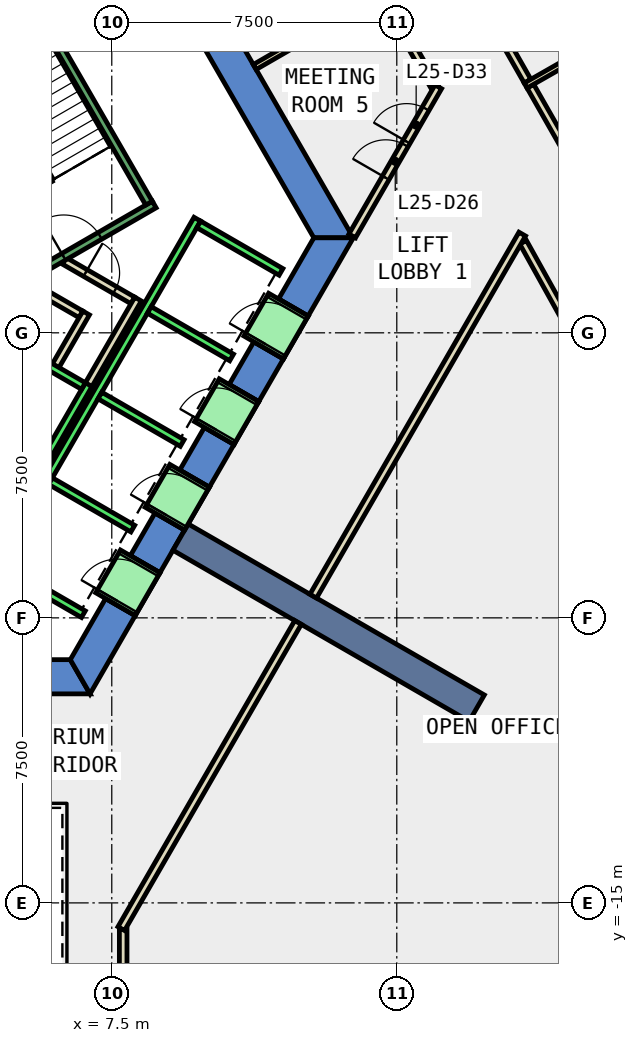
"""IFC4 building model, lengths in metres.
Left out: names, types, materials, properties, quantities, classifications, styles, units other than length and angle.
Written with IfcOpenShell. Run it as: python <this file> out.ifc"""

import sys

from ifc_helpers import new_model, si_unit, direction, frame, frame_2d, origin, place, context, subcontext, project, spatial, polyline, rectangle, outline, extrude, element, fill, save


model = new_model("IFC4")
c1 = context("Model", 3, precision=1e-05, world=origin(), true_north=direction((0.0, 1.0)))
c2 = subcontext(c1, "Body", "Model", "MODEL_VIEW")
j1 = project(units=[si_unit("LENGTHUNIT", "METRE"), si_unit("PLANEANGLEUNIT", "RADIAN")], contexts=[c1])
p1 = place(None, origin())
s1 = spatial("IfcSite", under=j1, at=p1, CompositionType="ELEMENT")
p2 = place(p1, origin())
s2 = spatial("IfcBuilding", under=s1, at=p2, CompositionType="ELEMENT")
p3 = place(p2, frame((0.0, 0.0, 116.0)))
s3 = spatial("IfcBuildingStorey", under=s2, at=p3, CompositionType="ELEMENT", Elevation=116.0)
p4 = place(p3, frame((0.0, 0.0, -0.4)))
e1 = element("IfcWall", 1, at=p4, inside=s3, PredefinedType="SHEAR", context=c2, shape_type="SweptSolid", body=[
    extrude(outline(polyline([(8.517, 11.748), (7.738, 11.298), (12.817, 2.5), (13.856, 2.5), (8.517, 11.748)])), origin(), (0.0, 0.0, 1.0), 4.2),
])
p5 = place(p3, frame((0.0, 0.0, -0.4)))
e2 = element("IfcWall", 2, at=p5, inside=s3, PredefinedType="SHEAR", context=c2, shape_type="SweptSolid", body=[
    extrude(outline(polyline([(5.75, -8.6), (5.75, -9.5), (6.928, -9.5), (6.409, -8.6), (5.75, -8.6)])), origin(), (0.0, 0.0, 1.0), 4.2),
])
p6 = place(p3, frame((0.0, 0.0, -0.4)))
e3 = element("IfcWall", 3, at=p6, inside=s3, PredefinedType="SHEAR", context=c2, shape_type="SweptSolid", body=[
    extrude(outline(polyline([(8.117, -7.44), (7.338, -6.99), (6.409, -8.6), (6.928, -9.5), (8.117, -7.44)])), origin(), (0.0, 0.0, 1.0), 4.2),
])
p7 = place(p3, frame((0.0, 0.0, -0.4)))
e4 = element("IfcWall", 4, at=p7, inside=s3, PredefinedType="SHEAR", context=c2, shape_type="SweptSolid", body=[
    extrude(outline(polyline([(9.417, -5.189), (8.638, -4.739), (7.988, -5.864), (8.767, -6.314), (9.417, -5.189)])), origin(), (0.0, 0.0, 1.0), 4.2),
])
p8 = place(p3, frame((0.0, 0.0, -0.4)))
e5 = element("IfcWall", 5, at=p8, inside=s3, PredefinedType="SHEAR", context=c2, shape_type="SweptSolid", body=[
    extrude(outline(polyline([(10.717, -2.937), (9.938, -2.487), (9.288, -3.613), (10.067, -4.063), (10.717, -2.937)])), origin(), (0.0, 0.0, 1.0), 4.2),
])
p9 = place(p3, frame((0.0, 0.0, -0.4)))
e6 = element("IfcWall", 6, at=p9, inside=s3, PredefinedType="SHEAR", context=c2, shape_type="SweptSolid", body=[
    extrude(outline(polyline([(12.017, -0.686), (11.238, -0.236), (10.588, -1.361), (11.367, -1.811), (12.017, -0.686)])), origin(), (0.0, 0.0, 1.0), 4.2),
])
p10 = place(p3, frame((0.0, 0.0, -0.4)))
e7 = element("IfcWall", 7, at=p10, inside=s3, PredefinedType="SHEAR", context=c2, shape_type="SweptSolid", body=[
    extrude(outline(polyline([(11.888, 0.89), (12.667, 0.44), (13.856, 2.5), (12.817, 2.5), (11.888, 0.89)])), origin(), (0.0, 0.0, 1.0), 4.2),
])
p11 = place(p3, frame((0.0, 0.0, 3.6)))
e8 = element("IfcWall", 8, at=p11, inside=s3, PredefinedType="SHEAR", context=c2, shape_type="SweptSolid", body=[
    extrude(outline(polyline([(8.767, -6.314), (7.988, -5.864), (7.338, -6.99), (8.117, -7.44), (8.767, -6.314)])), origin(), (0.0, 0.0, 1.0), 0.2),
])
p12 = place(p3, frame((0.0, 0.0, 3.6)))
e9 = element("IfcWall", 9, at=p12, inside=s3, PredefinedType="SHEAR", context=c2, shape_type="SweptSolid", body=[
    extrude(outline(polyline([(10.067, -4.063), (9.288, -3.613), (8.638, -4.739), (9.417, -5.189), (10.067, -4.063)])), origin(), (0.0, 0.0, 1.0), 0.2),
])
p13 = place(p3, frame((0.0, 0.0, 3.6)))
e10 = element("IfcWall", 10, at=p13, inside=s3, PredefinedType="SHEAR", context=c2, shape_type="SweptSolid", body=[
    extrude(outline(polyline([(11.367, -1.811), (10.588, -1.361), (9.938, -2.487), (10.717, -2.937), (11.367, -1.811)])), origin(), (0.0, 0.0, 1.0), 0.2),
])
p14 = place(p3, frame((0.0, 0.0, 3.6)))
e11 = element("IfcWall", 11, at=p14, inside=s3, PredefinedType="SHEAR", context=c2, shape_type="SweptSolid", body=[
    extrude(outline(polyline([(12.667, 0.44), (11.888, 0.89), (11.238, -0.236), (12.017, -0.686), (12.667, 0.44)])), origin(), (0.0, 0.0, 1.0), 0.2),
])
p15 = place(p3, frame((9.31, -5.375, -0.4), z_axis=(0.0, 0.0, 1.0), x_axis=(0.866017533419, -0.500013631625, 0.0)))
e12 = element("IfcWall", 12, at=p15, inside=s3, PredefinedType="SHEAR", context=c2, shape_type="SweptSolid", body=[
    extrude(rectangle(XDim=9.0, YDim=0.8, at=frame_2d((4.5, 0.0))), origin(), (0.0, 0.0, 1.0), 4.2),
])
p16 = place(p3, frame((15.993, 6.473, 0.0), z_axis=(0.0, 0.0, 1.0), x_axis=(-0.495159881733, 0.86880187127, 0.0)))
e13 = element("IfcWall", 13, at=p16, inside=s3, PredefinedType="PARTITIONING", context=c2, shape_type="SweptSolid", body=[
    extrude(rectangle(XDim=2.391, YDim=0.2, at=frame_2d((1.195, 0.0))), origin(), (0.0, 0.0, 1.0), 3.8),
])
p17 = place(p3, frame((21.773, -3.822, 0.0), z_axis=(0.0, 0.0, 1.0), x_axis=(-0.485826874234, 0.874055060206, 0.0)))
e14 = element("IfcWall", 14, at=p17, inside=s3, PredefinedType="PARTITIONING", context=c2, shape_type="SweptSolid", body=[
    extrude(rectangle(XDim=7.099, YDim=0.2, at=frame_2d((3.55, 0.0))), origin(), (0.0, 0.0, 1.0), 3.8),
])
p18 = place(p3, frame((18.515, 6.491, 0.0), z_axis=(0.0, 0.0, 1.0), x_axis=(0.495309264725, -0.868716715781, 0.0)))
e15 = element("IfcWall", 15, at=p18, inside=s3, PredefinedType="PARTITIONING", context=c2, shape_type="SweptSolid", body=[
    extrude(rectangle(XDim=3.487, YDim=0.2, at=frame_2d((1.743, 0.0))), origin(), (0.0, 0.0, 1.0), 3.8),
])
p19 = place(p3, frame((16.714, 9.65, 0.0), z_axis=(0.0, 0.0, 1.0), x_axis=(0.495286549488, -0.868729666753, 0.0)))
e16 = element("IfcWall", 16, at=p19, inside=s3, PredefinedType="PARTITIONING", context=c2, shape_type="SweptSolid", body=[
    extrude(rectangle(XDim=3.487, YDim=0.2, at=frame_2d((1.743, 0.0))), origin(), (0.0, 0.0, 1.0), 3.8),
])
p20 = place(p3, frame((5.499, 1.172, 0.0), z_axis=(0.0, 0.0, 1.0), x_axis=(0.866333505267, -0.499465972466, 0.0)))
e17 = element("IfcWall", 17, at=p20, inside=s3, PredefinedType="PARTITIONING", context=c2, shape_type="SweptSolid", body=[
    extrude(rectangle(XDim=1.374, YDim=0.2, at=frame_2d((0.687, 0.0))), origin(), (0.0, 0.0, 1.0), 3.8),
])
p21 = place(p3, frame((6.826, 0.522, 0.0), z_axis=(0.0, 0.0, 1.0), x_axis=(-0.500016722714, -0.866015748706, 0.0)))
e18 = element("IfcWall", 18, at=p21, inside=s3, PredefinedType="PARTITIONING", context=c2, shape_type="SweptSolid", body=[
    extrude(rectangle(XDim=1.7, YDim=0.2, at=frame_2d((0.85, 0.0))), origin(), (0.0, 0.0, 1.0), 3.8),
])
p22 = place(p3, frame((6.25, 1.894, 0.0), z_axis=(0.0, 0.0, 1.0), x_axis=(0.866043184279, -0.499969202016, 0.0)))
e19 = element("IfcWall", 19, at=p22, inside=s3, PredefinedType="PARTITIONING", context=c2, shape_type="SweptSolid", body=[
    extrude(rectangle(XDim=2.084, YDim=0.2, at=frame_2d((1.042, 0.0))), origin(), (0.0, 0.0, 1.0), 3.8),
])
p23 = place(p22, frame((0.642, 0.0, 0.0)))
e20 = element("IfcOpeningElement", 20, at=p23, cuts=e19, PredefinedType="OPENING", context=c2, shape_type="SweptSolid", body=[
    extrude(rectangle(XDim=0.9, YDim=2.1, at=frame_2d((0.45, 1.05))), frame((0.0, 0.11, 0.0), z_axis=(0.0, -1.0, 0.0), x_axis=(1.0, 0.0, 0.0)), (0.0, 0.0, 1.0), 0.22),
])
p24 = place(p3, frame((8.192, 0.888, 0.0), z_axis=(0.0, 0.0, 1.0), x_axis=(-0.499940625693, -0.866059680843, 0.0)))
e21 = element("IfcWall", 21, at=p24, inside=s3, PredefinedType="PARTITIONING", context=c2, shape_type="SweptSolid", body=[
    extrude(rectangle(XDim=2.68, YDim=0.2, at=frame_2d((1.34, 0.0))), origin(), (0.0, 0.0, 1.0), 3.8),
])
p25 = place(p3, frame((11.261, 6.994, 0.0), z_axis=(0.0, 0.0, 1.0), x_axis=(0.86605248387, 0.499953092981, 0.0)))
e22 = element("IfcWall", 22, at=p25, inside=s3, PredefinedType="PARTITIONING", context=c2, shape_type="SweptSolid", body=[
    extrude(rectangle(XDim=3.848, YDim=0.15, at=frame_2d((1.924, 0.0))), origin(), (0.0, 0.0, 1.0), 3.8),
])
p26 = place(p3, frame((13.827, 2.55, 0.0), z_axis=(0.0, 0.0, 1.0), x_axis=(0.500045913515, 0.865998893981, 0.0)))
e23 = element("IfcWall", 23, at=p26, inside=s3, PredefinedType="PARTITIONING", context=c2, shape_type="SweptSolid", body=[
    extrude(rectangle(XDim=4.53, YDim=0.2, at=frame_2d((2.265, 0.0))), origin(), (0.0, 0.0, 1.0), 3.8),
])
p27 = place(p26, frame((1.765, 0.0, 0.0)))
e24 = element("IfcOpeningElement", 24, at=p27, cuts=e23, PredefinedType="OPENING", context=c2, shape_type="SweptSolid", body=[
    extrude(rectangle(XDim=1.0, YDim=2.1, at=frame_2d((0.5, 1.05))), frame((0.0, 0.11, 0.0), z_axis=(0.0, -1.0, 0.0), x_axis=(1.0, 0.0, 0.0)), (0.0, 0.0, 1.0), 0.22),
])
p28 = place(p26, frame((2.865, 0.0, 0.0)))
e25 = element("IfcOpeningElement", 25, at=p28, cuts=e23, PredefinedType="OPENING", context=c2, shape_type="SweptSolid", body=[
    extrude(rectangle(XDim=1.0, YDim=2.1, at=frame_2d((0.5, 1.05))), frame((0.0, 0.11, 0.0), z_axis=(0.0, -1.0, 0.0), x_axis=(1.0, 0.0, 0.0)), (0.0, 0.0, 1.0), 0.22),
])
p29 = place(p3, frame((7.8, -15.69, 0.0), z_axis=(0.0, 0.0, 1.0), x_axis=(0.0, -1.0, 0.0)))
e26 = element("IfcWall", 26, at=p29, inside=s3, PredefinedType="PARTITIONING", context=c2, shape_type="SweptSolid", body=[
    extrude(rectangle(XDim=1.608, YDim=0.2, at=frame_2d((0.804, 0.0))), origin(), (0.0, 0.0, 1.0), 3.8),
])
p30 = place(p3, frame((18.301, 2.598, 0.0), z_axis=(0.0, 0.0, 1.0), x_axis=(-0.49997732567, -0.866038494419, 0.0)))
e27 = element("IfcWall", 27, at=p30, inside=s3, PredefinedType="PARTITIONING", context=c2, shape_type="SweptSolid", body=[
    extrude(rectangle(XDim=11.0, YDim=0.2, at=frame_2d((5.5, 0.0))), origin(), (0.0, 0.0, 1.0), 3.8),
])
p31 = place(p3, frame((18.391, 6.506, 0.0), z_axis=(0.0, 0.0, 1.0), x_axis=(0.868738258528, 0.495271479261, 0.0)))
e28 = element("IfcWall", 28, at=p31, inside=s3, PredefinedType="PARTITIONING", context=c2, shape_type="SweptSolid", body=[
    extrude(rectangle(XDim=7.701, YDim=0.15, at=frame_2d((3.85, 0.0))), origin(), (0.0, 0.0, 1.0), 3.8),
])
p32 = place(p3, frame((12.401, -7.621, 0.0), z_axis=(0.0, 0.0, 1.0), x_axis=(-0.499983724212, -0.866034800411, 0.0)))
e29 = element("IfcWall", 29, at=p32, inside=s3, PredefinedType="PARTITIONING", context=c2, shape_type="SweptSolid", body=[
    extrude(rectangle(XDim=9.302, YDim=0.2, at=frame_2d((4.651, 0.0))), origin(), (0.0, 0.0, 1.0), 3.8),
])
p33 = place(p3, frame((5.492, -3.788, 0.0), z_axis=(0.0, 0.0, 1.0), x_axis=(0.500011755427, 0.866018616679, 0.0)))
e30 = element("IfcWall", 30, at=p33, inside=s3, PredefinedType="STANDARD", context=c2, shape_type="SweptSolid", body=[
    extrude(rectangle(XDim=2.8, YDim=0.2, at=frame_2d((1.4, 0.0))), origin(), (0.0, 0.0, 1.0), 3.8),
])
p34 = place(p3, frame((4.677, -0.2, 0.0), z_axis=(0.0, 0.0, 1.0), x_axis=(0.865973769406, -0.500089422704, 0.0)))
e31 = element("IfcWall", 31, at=p34, inside=s3, PredefinedType="STANDARD", context=c2, shape_type="SweptSolid", body=[
    extrude(rectangle(XDim=2.399, YDim=0.2, at=frame_2d((1.2, 0.0))), origin(), (0.0, 0.0, 1.0), 3.8),
])
p35 = place(p3, frame((4.451, -6.19, 0.0), z_axis=(0.0, 0.0, 1.0), x_axis=(0.50000090737, 0.866024879913, 0.0)))
e32 = element("IfcWall", 32, at=p35, inside=s3, PredefinedType="STANDARD", context=c2, shape_type="SweptSolid", body=[
    extrude(rectangle(XDim=10.6, YDim=0.2, at=frame_2d((5.3, 0.0))), origin(), (0.0, 0.0, 1.0), 3.8),
])
for number, where, z_axis, x_axis in (
    (33, (4.588, -6.153, 0.0), (0.0, 0.0, 1.0), (0.866, -0.5, 0.0)),
    (34, (5.888, -3.902, 0.0), (0.0, 0.0, 1.0), (0.866, -0.5, 0.0)),
    (35, (7.188, -1.65, 0.0), (0.0, 0.0, 1.0), (0.866, -0.5, 0.0)),
    (36, (8.488, 0.602, 0.0), (0.0, 0.0, 1.0), (0.866, -0.5, 0.0)),
):
    element("IfcWall", number, at=place(p3, frame(where, z_axis=z_axis, x_axis=x_axis)), inside=s3, PredefinedType="STANDARD", context=c2, shape_type="SweptSolid", body=[
        extrude(rectangle(XDim=2.5, YDim=0.2, at=frame_2d((1.25, 0.0))), origin(), (0.0, 0.0, 1.0), 3.8),
    ])
p36 = place(p3, frame((9.788, 2.853, 0.0), z_axis=(0.0, 0.0, 1.0), x_axis=(0.865998541277, -0.500046524342, 0.0)))
e37 = element("IfcWall", 37, at=p36, inside=s3, PredefinedType="STANDARD", context=c2, shape_type="SweptSolid", body=[
    extrude(rectangle(XDim=2.5, YDim=0.2, at=frame_2d((1.25, 0.0))), origin(), (0.0, 0.0, 1.0), 3.8),
])
p37 = place(p3, frame((7.598, -7.14, 0.0), z_axis=(0.0, 0.0, 1.0), x_axis=(0.500362116554, 0.865816234728, 0.0)))
e38 = element("IfcWall", 38, at=p37, inside=s3, PredefinedType="STANDARD", context=c2, shape_type="SweptSolid", body=[
    extrude(rectangle(XDim=1.299, YDim=1.2, at=frame_2d((0.65, 0.0))), origin(), (0.0, 0.0, 1.0), 2.4),
])
p38 = place(p37, frame((0.1, 0.0, 0.0)))
e39 = element("IfcOpeningElement", 39, at=p38, cuts=e38, PredefinedType="OPENING", context=c2, shape_type="SweptSolid", body=[
    extrude(rectangle(XDim=1.1, YDim=2.3, at=frame_2d((0.55, 1.15))), frame((0.0, 0.61, 0.0), z_axis=(0.0, -1.0, 0.0), x_axis=(1.0, 0.0, 0.0)), (0.0, 0.0, 1.0), 1.22),
])
p39 = place(p3, frame((8.898, -4.889, 0.0), z_axis=(0.0, 0.0, 1.0), x_axis=(0.500036693733, 0.866004217611, 0.0)))
e40 = element("IfcWall", 40, at=p39, inside=s3, PredefinedType="STANDARD", context=c2, shape_type="SweptSolid", body=[
    extrude(rectangle(XDim=1.3, YDim=1.2, at=frame_2d((0.65, 0.0))), origin(), (0.0, 0.0, 1.0), 2.4),
])
p40 = place(p39, frame((0.1, 0.0, 0.0)))
e41 = element("IfcOpeningElement", 41, at=p40, cuts=e40, PredefinedType="OPENING", context=c2, shape_type="SweptSolid", body=[
    extrude(rectangle(XDim=1.1, YDim=2.3, at=frame_2d((0.55, 1.15))), frame((0.0, 0.61, 0.0), z_axis=(0.0, -1.0, 0.0), x_axis=(1.0, 0.0, 0.0)), (0.0, 0.0, 1.0), 1.22),
])
p41 = place(p3, frame((10.198, -2.637, 0.0), z_axis=(0.0, 0.0, 1.0), x_axis=(0.49989585183, 0.866085525409, 0.0)))
e42 = element("IfcWall", 42, at=p41, inside=s3, PredefinedType="STANDARD", context=c2, shape_type="SweptSolid", body=[
    extrude(rectangle(XDim=1.3, YDim=1.2, at=frame_2d((0.65, 0.0))), origin(), (0.0, 0.0, 1.0), 2.4),
])
p42 = place(p41, frame((0.1, 0.0, 0.0)))
e43 = element("IfcOpeningElement", 43, at=p42, cuts=e42, PredefinedType="OPENING", context=c2, shape_type="SweptSolid", body=[
    extrude(rectangle(XDim=1.1, YDim=2.3, at=frame_2d((0.55, 1.15))), frame((0.0, 0.61, 0.0), z_axis=(0.0, -1.0, 0.0), x_axis=(1.0, 0.0, 0.0)), (0.0, 0.0, 1.0), 1.22),
])
p43 = place(p3, frame((11.498, -0.385, 0.0), z_axis=(0.0, 0.0, 1.0), x_axis=(0.500221244143, 0.865897630733, 0.0)))
e44 = element("IfcWall", 44, at=p43, inside=s3, PredefinedType="STANDARD", context=c2, shape_type="SweptSolid", body=[
    extrude(rectangle(XDim=1.299, YDim=1.2, at=frame_2d((0.65, 0.0))), origin(), (0.0, 0.0, 1.0), 2.4),
])
p44 = place(p43, frame((0.1, 0.0, 0.0)))
e45 = element("IfcOpeningElement", 45, at=p44, cuts=e44, PredefinedType="OPENING", context=c2, shape_type="SweptSolid", body=[
    extrude(rectangle(XDim=1.1, YDim=2.3, at=frame_2d((0.55, 1.15))), frame((0.0, 0.61, 0.0), z_axis=(0.0, -1.0, 0.0), x_axis=(1.0, 0.0, 0.0)), (0.0, 0.0, 1.0), 1.22),
])
p45 = place(p3, frame((4.806, 1.176, 0.0), z_axis=(0.0, 0.0, 1.0), x_axis=(0.866059941101, 0.499940174841, 0.0)))
e46 = element("IfcWall", 46, at=p45, inside=s3, PredefinedType="STANDARD", context=c2, shape_type="SweptSolid", body=[
    extrude(rectangle(XDim=4.4, YDim=0.2, at=frame_2d((2.2, 0.0))), origin(), (0.0, 0.0, 1.0), 3.8),
])
p46 = place(p45, frame((1.65, 0.0, 0.0)))
e47 = element("IfcOpeningElement", 47, at=p46, cuts=e46, PredefinedType="OPENING", context=c2, shape_type="SweptSolid", body=[
    extrude(rectangle(XDim=1.1, YDim=2.2, at=frame_2d((0.55, 1.1))), frame((0.0, 0.11, 0.0), z_axis=(0.0, -1.0, 0.0), x_axis=(1.0, 0.0, 0.0)), (0.0, 0.0, 1.0), 0.22),
])
p47 = place(p3, frame((8.48, 3.412, 0.0), z_axis=(0.0, 0.0, 1.0), x_axis=(-0.499978703459, 0.866037698999, 0.0)))
e48 = element("IfcWall", 48, at=p47, inside=s3, PredefinedType="STANDARD", context=c2, shape_type="SweptSolid", body=[
    extrude(rectangle(XDim=6.9, YDim=0.2, at=frame_2d((3.45, 0.0))), origin(), (0.0, 0.0, 1.0), 3.8),
])
p48 = place(p27, origin())
e49 = element("IfcDoor", 49, at=p48, inside=s3, OperationType="SINGLE_SWING_LEFT", PredefinedType="DOOR", context=c2, shape_type="SweptSolid", body=[
    extrude(rectangle(XDim=1.0, YDim=2.1, at=frame_2d((0.5, 1.05))), frame((0.0, 0.025, 0.0), z_axis=(0.0, -1.0, 0.0), x_axis=(1.0, 0.0, 0.0)), (0.0, 0.0, 1.0), 0.05),
])
fill(e24, e49)
p49 = place(p23, origin())
e50 = element("IfcDoor", 50, at=p49, inside=s3, OperationType="SINGLE_SWING_LEFT", PredefinedType="DOOR", context=c2, shape_type="SweptSolid", body=[
    extrude(rectangle(XDim=0.9, YDim=2.1, at=frame_2d((0.45, 1.05))), frame((0.0, 0.025, 0.0), z_axis=(0.0, -1.0, 0.0), x_axis=(1.0, 0.0, 0.0)), (0.0, 0.0, 1.0), 0.05),
])
fill(e20, e50)
p50 = place(p28, origin())
e51 = element("IfcDoor", 51, at=p50, inside=s3, OperationType="SINGLE_SWING_RIGHT", PredefinedType="DOOR", context=c2, shape_type="SweptSolid", body=[
    extrude(rectangle(XDim=1.0, YDim=2.1, at=frame_2d((0.5, 1.05))), frame((0.0, 0.025, 0.0), z_axis=(0.0, -1.0, 0.0), x_axis=(1.0, 0.0, 0.0)), (0.0, 0.0, 1.0), 0.05),
])
fill(e25, e51)
p51 = place(p38, origin())
e52 = element("IfcDoor", 52, at=p51, inside=s3, OperationType="SLIDING_TO_LEFT", PredefinedType="DOOR", context=c2, shape_type="SweptSolid", body=[
    extrude(rectangle(XDim=1.1, YDim=2.3, at=frame_2d((0.55, 1.15))), frame((0.0, 0.025, 0.0), z_axis=(0.0, -1.0, 0.0), x_axis=(1.0, 0.0, 0.0)), (0.0, 0.0, 1.0), 0.05),
])
fill(e39, e52)
p52 = place(p40, origin())
e53 = element("IfcDoor", 53, at=p52, inside=s3, OperationType="SLIDING_TO_LEFT", PredefinedType="DOOR", context=c2, shape_type="SweptSolid", body=[
    extrude(rectangle(XDim=1.1, YDim=2.3, at=frame_2d((0.55, 1.15))), frame((0.0, 0.025, 0.0), z_axis=(0.0, -1.0, 0.0), x_axis=(1.0, 0.0, 0.0)), (0.0, 0.0, 1.0), 0.05),
])
fill(e41, e53)
p53 = place(p42, origin())
e54 = element("IfcDoor", 54, at=p53, inside=s3, OperationType="SLIDING_TO_LEFT", PredefinedType="DOOR", context=c2, shape_type="SweptSolid", body=[
    extrude(rectangle(XDim=1.1, YDim=2.3, at=frame_2d((0.55, 1.15))), frame((0.0, 0.025, 0.0), z_axis=(0.0, -1.0, 0.0), x_axis=(1.0, 0.0, 0.0)), (0.0, 0.0, 1.0), 0.05),
])
fill(e43, e54)
p54 = place(p44, origin())
e55 = element("IfcDoor", 55, at=p54, inside=s3, OperationType="SLIDING_TO_LEFT", PredefinedType="DOOR", context=c2, shape_type="SweptSolid", body=[
    extrude(rectangle(XDim=1.1, YDim=2.3, at=frame_2d((0.55, 1.15))), frame((0.0, 0.025, 0.0), z_axis=(0.0, -1.0, 0.0), x_axis=(1.0, 0.0, 0.0)), (0.0, 0.0, 1.0), 0.05),
])
fill(e45, e55)
p55 = place(p46, origin())
e56 = element("IfcDoor", 56, at=p55, inside=s3, OperationType="SINGLE_SWING_LEFT", PredefinedType="DOOR", context=c2, shape_type="SweptSolid", body=[
    extrude(rectangle(XDim=1.1, YDim=2.2, at=frame_2d((0.55, 1.1))), frame((0.0, 0.025, 0.0), z_axis=(0.0, -1.0, 0.0), x_axis=(1.0, 0.0, 0.0)), (0.0, 0.0, 1.0), 0.05),
])
fill(e47, e56)
save(model, sys.argv[1])
